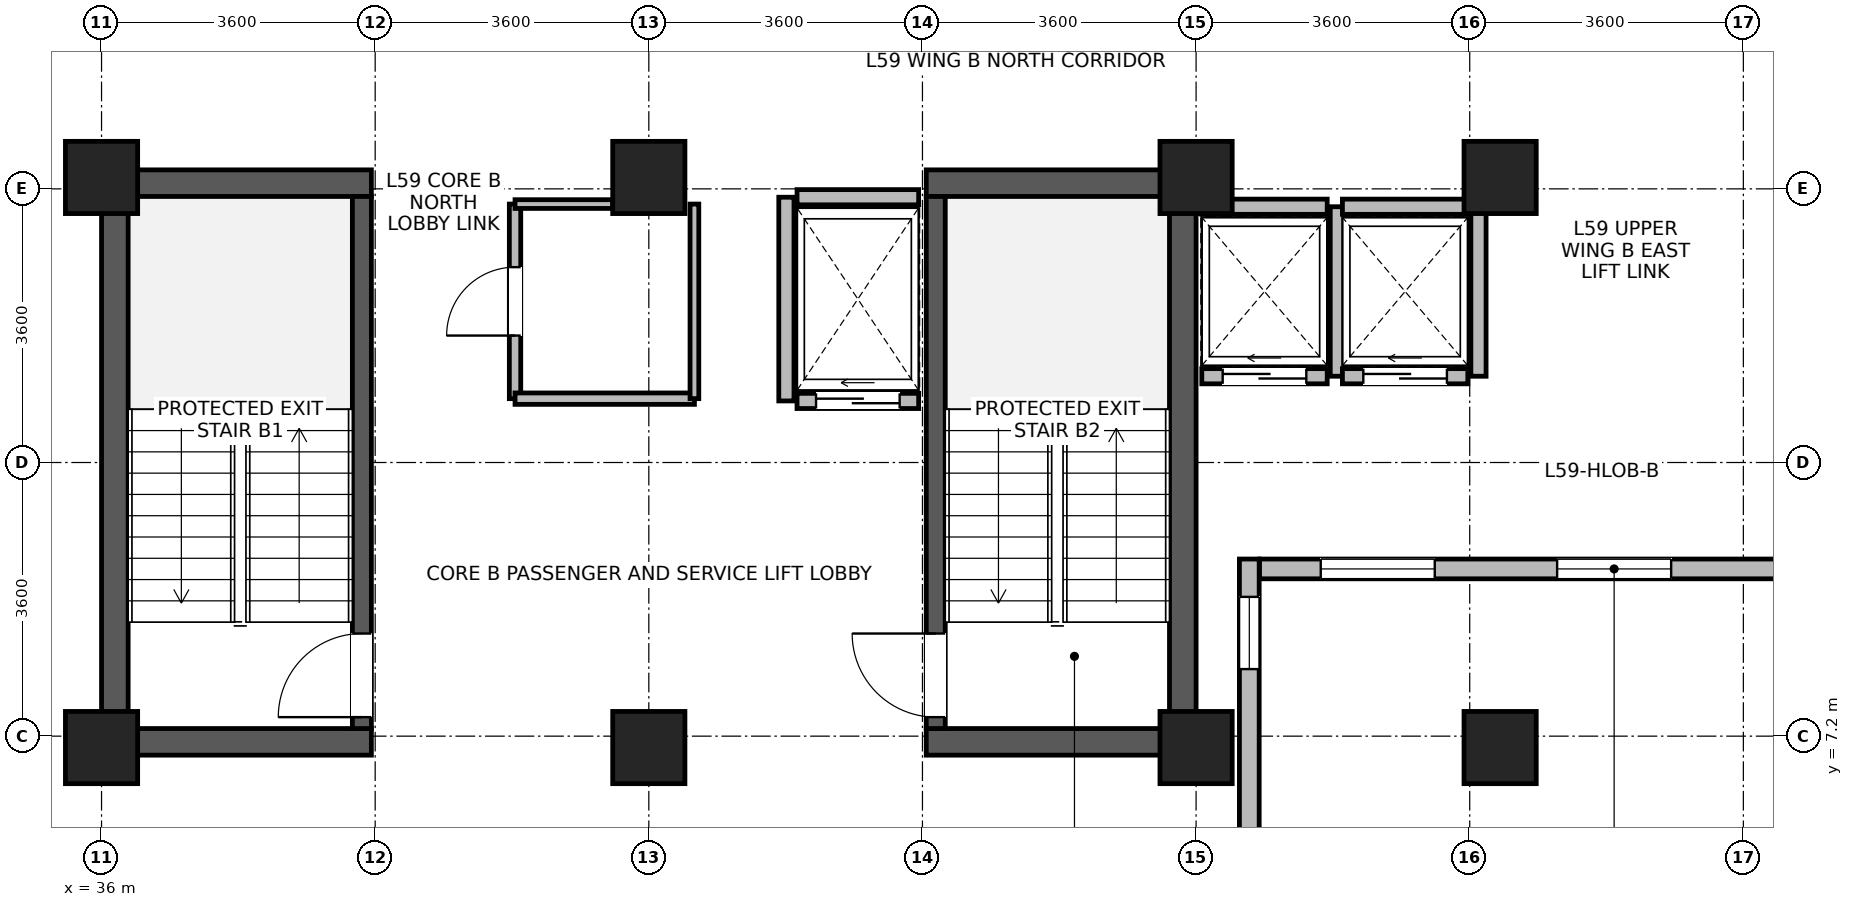
"""IFC4 building model, lengths in metres.
Left out: names, types, materials, properties, quantities, classifications, styles, units other than length and angle.
Written with IfcOpenShell. Run it as: python <this file> out.ifc"""

import sys

from ifc_helpers import new_model, si_unit, direction, frame, frame_2d, origin, origin_2d, place, context, subcontext, project, spatial, rectangle, extrude, source, transform, mapped, element, fill, save


model = new_model("IFC4")
c1 = context("Model", 3, precision=1e-05, world=origin(), true_north=direction((0.0, 1.0)))
c2 = subcontext(c1, "Body", "Model", "MODEL_VIEW")
j1 = project(units=[si_unit("LENGTHUNIT", "METRE"), si_unit("PLANEANGLEUNIT", "RADIAN")], contexts=[c1])
p1 = place(None, origin())
s1 = spatial("IfcSite", under=j1, at=p1, CompositionType="ELEMENT")
p2 = place(p1, origin())
s2 = spatial("IfcBuilding", under=s1, at=p2, CompositionType="ELEMENT")
p3 = place(p2, frame((0.0, 0.0, 231.4)))
s3 = spatial("IfcBuildingStorey", under=s2, at=p3, CompositionType="ELEMENT", Elevation=231.4)
for number, where, z_axis, x_axis in (
    (1, (36.175, 6.95, 0.0), (0.0, 0.0, 1.0), (0.0, 1.0, 0.0)),
    (2, (50.225, 6.95, 0.0), (0.0, 0.0, 1.0), (0.0, 1.0, 0.0)),
):
    element("IfcWall", number, at=place(p3, frame(where, z_axis=z_axis, x_axis=x_axis)), inside=s3, PredefinedType="SHEAR", context=c2, shape_type="SweptSolid", body=[
        extrude(rectangle(XDim=7.7, YDim=0.35, at=frame_2d((3.85, 0.0))), origin(), (0.0, 0.0, 1.0), 3.44),
    ])
for number, where, z_axis, x_axis in (
    (3, (36.35, 7.125, 0.0), (0.0, 0.0, 1.0), (1.0, 0.0, 0.0)),
    (4, (46.85, 7.125, 0.0), (0.0, 0.0, 1.0), (1.0, 0.0, 0.0)),
    (5, (36.35, 14.475, 0.0), (0.0, 0.0, 1.0), (1.0, 0.0, 0.0)),
    (6, (46.85, 14.475, 0.0), (0.0, 0.0, 1.0), (1.0, 0.0, 0.0)),
):
    element("IfcWall", number, at=place(p3, frame(where, z_axis=z_axis, x_axis=x_axis)), inside=s3, PredefinedType="SHEAR", context=c2, shape_type="SweptSolid", body=[
        extrude(rectangle(XDim=3.2, YDim=0.35, at=frame_2d((1.6, 0.0))), origin(), (0.0, 0.0, 1.0), 3.44),
    ])
p4 = place(p3, frame((39.425, 7.3, 0.0), z_axis=(0.0, 0.0, 1.0), x_axis=(0.0, 1.0, 0.0)))
e7 = element("IfcWall", 7, at=p4, inside=s3, PredefinedType="SHEAR", context=c2, shape_type="SweptSolid", body=[
    extrude(rectangle(XDim=7.0, YDim=0.25, at=frame_2d((3.5, 0.0))), origin(), (0.0, 0.0, 1.0), 3.44),
])
p5 = place(p4, frame((0.15, 0.0, 0.0)))
e8 = element("IfcOpeningElement", 8, at=p5, cuts=e7, PredefinedType="OPENING", context=c2, shape_type="SweptSolid", body=[
    extrude(rectangle(XDim=1.1, YDim=2.08, at=frame_2d((0.55, 1.04))), frame((0.0, 0.135, 0.0), z_axis=(0.0, -1.0, 0.0), x_axis=(1.0, 0.0, 0.0)), (0.0, 0.0, 1.0), 0.27),
])
p6 = place(p3, frame((46.975, 7.3, 0.0), z_axis=(0.0, 0.0, 1.0), x_axis=(0.0, 1.0, 0.0)))
e9 = element("IfcWall", 9, at=p6, inside=s3, PredefinedType="SHEAR", context=c2, shape_type="SweptSolid", body=[
    extrude(rectangle(XDim=7.0, YDim=0.25, at=frame_2d((3.5, 0.0))), origin(), (0.0, 0.0, 1.0), 3.44),
])
p7 = place(p6, frame((0.15, 0.0, 0.0)))
e10 = element("IfcOpeningElement", 10, at=p7, cuts=e9, PredefinedType="OPENING", context=c2, shape_type="SweptSolid", body=[
    extrude(rectangle(XDim=1.1, YDim=2.08, at=frame_2d((0.55, 1.04))), frame((0.0, 0.135, 0.0), z_axis=(0.0, -1.0, 0.0), x_axis=(1.0, 0.0, 0.0)), (0.0, 0.0, 1.0), 0.27),
])
m1 = source(origin(), c2, "Body", "SweptSolid", [
    extrude(rectangle(XDim=0.95, YDim=0.95, at=origin_2d()), origin(), (0.0, 0.0, 1.0), 3.7),
])
for number, where, z_axis, x_axis in (
    (11, (36.0, 7.05, 0.0), (0.0, 0.0, 1.0), (1.0, 0.0, 0.0)),
    (12, (36.0, 14.55, 0.0), (0.0, 0.0, 1.0), (1.0, 0.0, 0.0)),
    (13, (43.2, 7.05, 0.0), (0.0, 0.0, 1.0), (1.0, 0.0, 0.0)),
    (14, (43.2, 14.55, 0.0), (0.0, 0.0, 1.0), (1.0, 0.0, 0.0)),
    (15, (50.4, 7.05, 0.0), (0.0, 0.0, 1.0), (1.0, 0.0, 0.0)),
    (16, (50.4, 14.55, 0.0), (0.0, 0.0, 1.0), (1.0, 0.0, 0.0)),
    (17, (54.4, 7.05, 0.0), (0.0, 0.0, 1.0), (1.0, 0.0, 0.0)),
    (18, (54.4, 14.55, 0.0), (0.0, 0.0, 1.0), (1.0, 0.0, 0.0)),
):
    element("IfcColumn", number, at=place(p3, frame(where, z_axis=z_axis, x_axis=x_axis)), inside=s3, PredefinedType="COLUMN", context=c2, shape_type="MappedRepresentation", body=[
        mapped(m1, transform((0.0, 0.0, 0.0), x_axis=(1.0, 0.0, 0.0), y_axis=(0.0, 1.0, 0.0), z_axis=(0.0, 0.0, 1.0), scale=1.0)),
    ])
p8 = place(p3, frame((51.1, 9.53, 0.0), z_axis=(0.0, 0.0, 1.0), x_axis=(0.0, -1.0, 0.0)))
e19 = element("IfcWall", 19, at=p8, inside=s3, PredefinedType="STANDARD", context=c2, shape_type="SweptSolid", body=[
    extrude(rectangle(XDim=3.86, YDim=0.26, at=frame_2d((1.93, 0.0))), origin(), (0.0, 0.0, 1.0), 3.42),
])
p9 = place(p8, frame((0.498, 0.0, 0.85)))
e20 = element("IfcOpeningElement", 20, at=p9, cuts=e19, PredefinedType="OPENING", context=c2, shape_type="SweptSolid", body=[
    extrude(rectangle(XDim=0.95, YDim=1.75, at=frame_2d((0.475, 0.875))), frame((0.0, 0.14, 0.0), z_axis=(0.0, -1.0, 0.0), x_axis=(1.0, 0.0, 0.0)), (0.0, 0.0, 1.0), 0.28),
])
p10 = place(p3, frame((60.565, 9.4, 0.0), z_axis=(0.0, 0.0, 1.0), x_axis=(-1.0, 0.0, 0.0)))
e21 = element("IfcWall", 21, at=p10, inside=s3, PredefinedType="STANDARD", context=c2, shape_type="SweptSolid", body=[
    extrude(rectangle(XDim=9.33, YDim=0.26, at=frame_2d((4.665, 0.0))), origin(), (0.0, 0.0, 1.0), 3.42),
])
p11 = place(p10, frame((0.805, 0.0, 0.85)))
e22 = element("IfcOpeningElement", 22, at=p11, cuts=e21, PredefinedType="OPENING", context=c2, shape_type="SweptSolid", body=[
    extrude(rectangle(XDim=1.5, YDim=1.85, at=frame_2d((0.75, 0.925))), frame((0.0, 0.14, 0.0), z_axis=(0.0, -1.0, 0.0), x_axis=(1.0, 0.0, 0.0)), (0.0, 0.0, 1.0), 0.28),
])
p12 = place(p10, frame((3.915, 0.0, 0.85)))
e23 = element("IfcOpeningElement", 23, at=p12, cuts=e21, PredefinedType="OPENING", context=c2, shape_type="SweptSolid", body=[
    extrude(rectangle(XDim=1.5, YDim=1.85, at=frame_2d((0.75, 0.925))), frame((0.0, 0.14, 0.0), z_axis=(0.0, -1.0, 0.0), x_axis=(1.0, 0.0, 0.0)), (0.0, 0.0, 1.0), 0.28),
])
p13 = place(p10, frame((7.025, 0.0, 0.85)))
e24 = element("IfcOpeningElement", 24, at=p13, cuts=e21, PredefinedType="OPENING", context=c2, shape_type="SweptSolid", body=[
    extrude(rectangle(XDim=1.5, YDim=1.85, at=frame_2d((0.75, 0.925))), frame((0.0, 0.14, 0.0), z_axis=(0.0, -1.0, 0.0), x_axis=(1.0, 0.0, 0.0)), (0.0, 0.0, 1.0), 0.28),
])
p14 = place(p3, frame((50.475, 11.935, 0.0), z_axis=(0.0, 0.0, 1.0), x_axis=(1.0, 0.0, 0.0)))
e25 = element("IfcWall", 25, at=p14, inside=s3, PredefinedType="PARTITIONING", context=c2, shape_type="SweptSolid", body=[
    extrude(rectangle(XDim=1.65, YDim=0.2, at=frame_2d((0.825, 0.0))), origin(), (0.0, 0.0, 1.0), 3.42),
])
p15 = place(p14, frame((0.275, 0.0, 0.0)))
e26 = element("IfcOpeningElement", 26, at=p15, cuts=e25, PredefinedType="OPENING", context=c2, shape_type="SweptSolid", body=[
    extrude(rectangle(XDim=1.1, YDim=2.12, at=frame_2d((0.55, 1.06))), frame((0.0, 0.11, 0.0), z_axis=(0.0, -1.0, 0.0), x_axis=(1.0, 0.0, 0.0)), (0.0, 0.0, 1.0), 0.22),
])
p16 = place(p3, frame((50.475, 14.165, 0.0), z_axis=(0.0, 0.0, 1.0), x_axis=(1.0, 0.0, 0.0)))
e27 = element("IfcWall", 27, at=p16, inside=s3, PredefinedType="PARTITIONING", context=c2, shape_type="SweptSolid", body=[
    extrude(rectangle(XDim=1.65, YDim=0.2, at=frame_2d((0.825, 0.0))), origin(), (0.0, 0.0, 1.0), 3.42),
])
p17 = place(p3, frame((52.265, 11.935, 0.0), z_axis=(0.0, 0.0, 1.0), x_axis=(0.0, 1.0, 0.0)))
e28 = element("IfcWall", 28, at=p17, inside=s3, PredefinedType="PARTITIONING", context=c2, shape_type="SweptSolid", body=[
    extrude(rectangle(XDim=2.23, YDim=0.2, at=frame_2d((1.115, 0.0))), origin(), (0.0, 0.0, 1.0), 3.42),
])
p18 = place(p3, frame((52.325, 11.935, 0.0), z_axis=(0.0, 0.0, 1.0), x_axis=(1.0, 0.0, 0.0)))
e29 = element("IfcWall", 29, at=p18, inside=s3, PredefinedType="PARTITIONING", context=c2, shape_type="SweptSolid", body=[
    extrude(rectangle(XDim=1.65, YDim=0.2, at=frame_2d((0.825, 0.0))), origin(), (0.0, 0.0, 1.0), 3.42),
])
p19 = place(p18, frame((0.275, 0.0, 0.0)))
e30 = element("IfcOpeningElement", 30, at=p19, cuts=e29, PredefinedType="OPENING", context=c2, shape_type="SweptSolid", body=[
    extrude(rectangle(XDim=1.1, YDim=2.12, at=frame_2d((0.55, 1.06))), frame((0.0, 0.11, 0.0), z_axis=(0.0, -1.0, 0.0), x_axis=(1.0, 0.0, 0.0)), (0.0, 0.0, 1.0), 0.22),
])
p20 = place(p3, frame((52.325, 14.165, 0.0), z_axis=(0.0, 0.0, 1.0), x_axis=(1.0, 0.0, 0.0)))
e31 = element("IfcWall", 31, at=p20, inside=s3, PredefinedType="PARTITIONING", context=c2, shape_type="SweptSolid", body=[
    extrude(rectangle(XDim=1.65, YDim=0.2, at=frame_2d((0.825, 0.0))), origin(), (0.0, 0.0, 1.0), 3.42),
])
p21 = place(p3, frame((54.115, 11.935, 0.0), z_axis=(0.0, 0.0, 1.0), x_axis=(0.0, 1.0, 0.0)))
e32 = element("IfcWall", 32, at=p21, inside=s3, PredefinedType="PARTITIONING", context=c2, shape_type="SweptSolid", body=[
    extrude(rectangle(XDim=2.23, YDim=0.2, at=frame_2d((1.115, 0.0))), origin(), (0.0, 0.0, 1.0), 3.42),
])
p22 = place(p3, frame((45.15, 11.61, 0.0), z_axis=(0.0, 0.0, 1.0), x_axis=(1.0, 0.0, 0.0)))
e33 = element("IfcWall", 33, at=p22, inside=s3, PredefinedType="PARTITIONING", context=c2, shape_type="SweptSolid", body=[
    extrude(rectangle(XDim=1.6, YDim=0.2, at=frame_2d((0.8, 0.0))), origin(), (0.0, 0.0, 1.0), 3.42),
])
p23 = place(p22, frame((0.25, 0.0, 0.0)))
e34 = element("IfcOpeningElement", 34, at=p23, cuts=e33, PredefinedType="OPENING", context=c2, shape_type="SweptSolid", body=[
    extrude(rectangle(XDim=1.1, YDim=2.12, at=frame_2d((0.55, 1.06))), frame((0.0, 0.11, 0.0), z_axis=(0.0, -1.0, 0.0), x_axis=(1.0, 0.0, 0.0)), (0.0, 0.0, 1.0), 0.22),
])
p24 = place(p3, frame((45.15, 14.29, 0.0), z_axis=(0.0, 0.0, 1.0), x_axis=(1.0, 0.0, 0.0)))
e35 = element("IfcWall", 35, at=p24, inside=s3, PredefinedType="PARTITIONING", context=c2, shape_type="SweptSolid", body=[
    extrude(rectangle(XDim=1.6, YDim=0.2, at=frame_2d((0.8, 0.0))), origin(), (0.0, 0.0, 1.0), 2.52),
])
p25 = place(p3, frame((45.01, 11.61, 0.0), z_axis=(0.0, 0.0, 1.0), x_axis=(0.0, 1.0, 0.0)))
e36 = element("IfcWall", 36, at=p25, inside=s3, PredefinedType="PARTITIONING", context=c2, shape_type="SweptSolid", body=[
    extrude(rectangle(XDim=2.68, YDim=0.2, at=frame_2d((1.34, 0.0))), origin(), (0.0, 0.0, 1.0), 3.42),
])
p26 = place(p3, frame((41.44, 11.64, 0.0), z_axis=(0.0, 0.0, 1.0), x_axis=(0.0, 1.0, 0.0)))
e37 = element("IfcWall", 37, at=p26, inside=s3, PredefinedType="PARTITIONING", context=c2, shape_type="SweptSolid", body=[
    extrude(rectangle(XDim=2.56, YDim=0.15, at=frame_2d((1.28, 0.0))), origin(), (0.0, 0.0, 1.0), 3.42),
])
p27 = place(p26, frame((0.83, 0.0, 0.0)))
e38 = element("IfcOpeningElement", 38, at=p27, cuts=e37, PredefinedType="OPENING", context=c2, shape_type="SweptSolid", body=[
    extrude(rectangle(XDim=0.9, YDim=2.08, at=frame_2d((0.45, 1.04))), frame((0.0, 0.085, 0.0), z_axis=(0.0, -1.0, 0.0), x_axis=(1.0, 0.0, 0.0)), (0.0, 0.0, 1.0), 0.17),
])
p28 = place(p3, frame((41.44, 11.64, 0.0), z_axis=(0.0, 0.0, 1.0), x_axis=(1.0, 0.0, 0.0)))
e39 = element("IfcWall", 39, at=p28, inside=s3, PredefinedType="PARTITIONING", context=c2, shape_type="SweptSolid", body=[
    extrude(rectangle(XDim=2.36, YDim=0.15, at=frame_2d((1.18, 0.0))), origin(), (0.0, 0.0, 1.0), 3.42),
])
p29 = place(p3, frame((43.8, 11.64, 0.0), z_axis=(0.0, 0.0, 1.0), x_axis=(0.0, 1.0, 0.0)))
e40 = element("IfcWall", 40, at=p29, inside=s3, PredefinedType="PARTITIONING", context=c2, shape_type="SweptSolid", body=[
    extrude(rectangle(XDim=2.56, YDim=0.115, at=frame_2d((1.28, 0.0))), origin(), (0.0, 0.0, 1.0), 3.42),
])
p30 = place(p3, frame((41.44, 14.2, 0.0), z_axis=(0.0, 0.0, 1.0), x_axis=(1.0, 0.0, 0.0)))
e41 = element("IfcWall", 41, at=p30, inside=s3, PredefinedType="PARTITIONING", context=c2, shape_type="SweptSolid", body=[
    extrude(rectangle(XDim=1.285, YDim=0.115, at=frame_2d((0.643, 0.0))), origin(), (0.0, 0.0, 1.0), 2.52),
])
p31 = place(p9, origin())
e42 = element("IfcWindow", 42, at=p31, inside=s3, PartitioningType="SINGLE_PANEL", PredefinedType="WINDOW", context=c2, shape_type="SweptSolid", body=[
    extrude(rectangle(XDim=0.95, YDim=1.75, at=frame_2d((0.475, 0.875))), frame((0.0, 0.03, 0.0), z_axis=(0.0, -1.0, 0.0), x_axis=(1.0, 0.0, 0.0)), (0.0, 0.0, 1.0), 0.06),
])
fill(e20, e42)
p32 = place(p12, origin())
e43 = element("IfcWindow", 43, at=p32, inside=s3, PartitioningType="SINGLE_PANEL", PredefinedType="WINDOW", context=c2, shape_type="SweptSolid", body=[
    extrude(rectangle(XDim=1.5, YDim=1.85, at=frame_2d((0.75, 0.925))), frame((0.0, 0.03, 0.0), z_axis=(0.0, -1.0, 0.0), x_axis=(1.0, 0.0, 0.0)), (0.0, 0.0, 1.0), 0.06),
])
fill(e23, e43)
p33 = place(p13, origin())
e44 = element("IfcWindow", 44, at=p33, inside=s3, PartitioningType="SINGLE_PANEL", PredefinedType="WINDOW", context=c2, shape_type="SweptSolid", body=[
    extrude(rectangle(XDim=1.5, YDim=1.85, at=frame_2d((0.75, 0.925))), frame((0.0, 0.03, 0.0), z_axis=(0.0, -1.0, 0.0), x_axis=(1.0, 0.0, 0.0)), (0.0, 0.0, 1.0), 0.06),
])
fill(e24, e44)
p34 = place(p5, origin())
e45 = element("IfcDoor", 45, at=p34, inside=s3, OperationType="SINGLE_SWING_LEFT", PredefinedType="DOOR", context=c2, shape_type="SweptSolid", body=[
    extrude(rectangle(XDim=1.1, YDim=2.08, at=frame_2d((0.55, 1.04))), frame((0.0, 0.025, 0.0), z_axis=(0.0, -1.0, 0.0), x_axis=(1.0, 0.0, 0.0)), (0.0, 0.0, 1.0), 0.05),
])
fill(e8, e45)
p35 = place(p7, origin())
e46 = element("IfcDoor", 46, at=p35, inside=s3, OperationType="SINGLE_SWING_RIGHT", PredefinedType="DOOR", context=c2, shape_type="SweptSolid", body=[
    extrude(rectangle(XDim=1.1, YDim=2.08, at=frame_2d((0.55, 1.04))), frame((0.0, 0.025, 0.0), z_axis=(0.0, -1.0, 0.0), x_axis=(1.0, 0.0, 0.0)), (0.0, 0.0, 1.0), 0.05),
])
fill(e10, e46)
p36 = place(p15, origin())
e47 = element("IfcDoor", 47, at=p36, inside=s3, OperationType="SLIDING_TO_LEFT", PredefinedType="DOOR", context=c2, shape_type="SweptSolid", body=[
    extrude(rectangle(XDim=1.1, YDim=2.12, at=frame_2d((0.55, 1.06))), frame((0.0, 0.025, 0.0), z_axis=(0.0, -1.0, 0.0), x_axis=(1.0, 0.0, 0.0)), (0.0, 0.0, 1.0), 0.05),
])
fill(e26, e47)
p37 = place(p19, origin())
e48 = element("IfcDoor", 48, at=p37, inside=s3, OperationType="SLIDING_TO_LEFT", PredefinedType="DOOR", context=c2, shape_type="SweptSolid", body=[
    extrude(rectangle(XDim=1.1, YDim=2.12, at=frame_2d((0.55, 1.06))), frame((0.0, 0.025, 0.0), z_axis=(0.0, -1.0, 0.0), x_axis=(1.0, 0.0, 0.0)), (0.0, 0.0, 1.0), 0.05),
])
fill(e30, e48)
p38 = place(p23, origin())
e49 = element("IfcDoor", 49, at=p38, inside=s3, OperationType="SLIDING_TO_LEFT", PredefinedType="DOOR", context=c2, shape_type="SweptSolid", body=[
    extrude(rectangle(XDim=1.1, YDim=2.12, at=frame_2d((0.55, 1.06))), frame((0.0, 0.025, 0.0), z_axis=(0.0, -1.0, 0.0), x_axis=(1.0, 0.0, 0.0)), (0.0, 0.0, 1.0), 0.05),
])
fill(e34, e49)
p39 = place(p27, origin())
e50 = element("IfcDoor", 50, at=p39, inside=s3, OperationType="SINGLE_SWING_LEFT", PredefinedType="DOOR", context=c2, shape_type="SweptSolid", body=[
    extrude(rectangle(XDim=0.9, YDim=2.08, at=frame_2d((0.45, 1.04))), frame((0.0, 0.025, 0.0), z_axis=(0.0, -1.0, 0.0), x_axis=(1.0, 0.0, 0.0)), (0.0, 0.0, 1.0), 0.05),
])
fill(e38, e50)
save(model, sys.argv[1])
